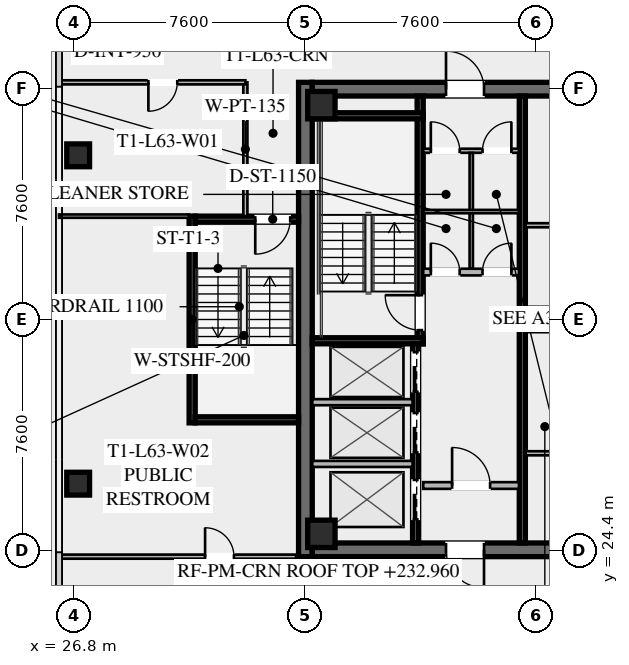
"""IFC4 building model, lengths in metres.
Left out: names, types, materials, properties, quantities, classifications, styles, units other than length and angle.
Written with IfcOpenShell. Run it as: python <this file> out.ifc"""

import sys

from ifc_helpers import new_model, si_unit, direction, frame, frame_2d, origin, origin_2d, place, context, subcontext, project, spatial, rectangle, hollow_rectangle, extrude, element, fill, save


model = new_model("IFC4")
c1 = context("Model", 3, precision=1e-05, world=origin(), true_north=direction((0.0, 1.0)))
c2 = subcontext(c1, "Body", "Model", "MODEL_VIEW")
j1 = project(units=[si_unit("LENGTHUNIT", "METRE"), si_unit("PLANEANGLEUNIT", "RADIAN")], contexts=[c1])
p1 = place(None, origin())
s1 = spatial("IfcSite", under=j1, at=p1, CompositionType="ELEMENT")
p2 = place(p1, origin())
s2 = spatial("IfcBuilding", under=s1, at=p2, CompositionType="ELEMENT")
p3 = place(p2, frame((0.0, 0.0, 232.6)))
s3 = spatial("IfcBuildingStorey", under=s2, at=p3, CompositionType="ELEMENT", Elevation=232.6)
p4 = place(p3, frame((34.425, 24.2, 0.0), z_axis=(0.0, 0.0, 1.0), x_axis=(0.0, 1.0, 0.0)))
e1 = element("IfcWall", 1, at=p4, inside=s3, PredefinedType="SHEAR", context=c2, shape_type="SweptSolid", body=[
    extrude(rectangle(XDim=15.6, YDim=0.45, at=frame_2d((7.8, 0.0))), origin(), (0.0, 0.0, 1.0), 3.55),
])
p5 = place(p3, frame((49.35, 24.425, 0.0), z_axis=(0.0, 0.0, 1.0), x_axis=(-1.0, 0.0, 0.0)))
e2 = element("IfcWall", 2, at=p5, inside=s3, PredefinedType="SHEAR", context=c2, shape_type="SweptSolid", body=[
    extrude(rectangle(XDim=14.7, YDim=0.45, at=frame_2d((7.35, 0.0))), origin(), (0.0, 0.0, 1.0), 3.55),
])
p6 = place(p5, frame((9.05, 0.0, 0.0)))
e3 = element("IfcOpeningElement", 3, at=p6, cuts=e2, PredefinedType="OPENING", context=c2, shape_type="SweptSolid", body=[
    extrude(rectangle(XDim=1.25, YDim=2.25, at=frame_2d((0.625, 1.125))), frame((0.0, 0.235, 0.0), z_axis=(0.0, -1.0, 0.0), x_axis=(1.0, 0.0, 0.0)), (0.0, 0.0, 1.0), 0.47),
])
p7 = place(p5, frame((4.0, 0.0, 0.0)))
e4 = element("IfcOpeningElement", 4, at=p7, cuts=e2, PredefinedType="OPENING", context=c2, shape_type="SweptSolid", body=[
    extrude(rectangle(XDim=1.25, YDim=2.25, at=frame_2d((0.625, 1.125))), frame((0.0, 0.235, 0.0), z_axis=(0.0, -1.0, 0.0), x_axis=(1.0, 0.0, 0.0)), (0.0, 0.0, 1.0), 0.47),
])
p8 = place(p3, frame((34.65, 39.575, 0.0), z_axis=(0.0, 0.0, 1.0), x_axis=(1.0, 0.0, 0.0)))
e5 = element("IfcWall", 5, at=p8, inside=s3, PredefinedType="SHEAR", context=c2, shape_type="SweptSolid", body=[
    extrude(rectangle(XDim=14.7, YDim=0.45, at=frame_2d((7.35, 0.0))), origin(), (0.0, 0.0, 1.0), 3.55),
])
p9 = place(p8, frame((4.4, 0.0, 0.0)))
e6 = element("IfcOpeningElement", 6, at=p9, cuts=e5, PredefinedType="OPENING", context=c2, shape_type="SweptSolid", body=[
    extrude(rectangle(XDim=1.25, YDim=2.25, at=frame_2d((0.625, 1.125))), frame((0.0, 0.235, 0.0), z_axis=(0.0, -1.0, 0.0), x_axis=(1.0, 0.0, 0.0)), (0.0, 0.0, 1.0), 0.47),
])
p10 = place(p8, frame((9.45, 0.0, 0.0)))
e7 = element("IfcOpeningElement", 7, at=p10, cuts=e5, PredefinedType="OPENING", context=c2, shape_type="SweptSolid", body=[
    extrude(rectangle(XDim=1.25, YDim=2.25, at=frame_2d((0.625, 1.125))), frame((0.0, 0.235, 0.0), z_axis=(0.0, -1.0, 0.0), x_axis=(1.0, 0.0, 0.0)), (0.0, 0.0, 1.0), 0.47),
])
for number, where, z_axis, x_axis in (
    (8, (34.95, 24.95, 0.0), (0.0, 0.0, 1.0), (1.0, 0.0, 0.0)),
    (9, (34.95, 39.05, 0.0), (0.0, 0.0, 1.0), (1.0, 0.0, 0.0)),
):
    element("IfcColumn", number, at=place(p3, frame(where, z_axis=z_axis, x_axis=x_axis)), inside=s3, PredefinedType="COLUMN", context=c2, shape_type="SweptSolid", body=[
        extrude(hollow_rectangle(XDim=0.9, YDim=0.9, WallThickness=0.04, at=origin_2d()), origin(), (0.0, 0.0, 1.0), 3.37),
    ])
for number, where, z_axis, x_axis in (
    (10, (26.95, 37.4, -0.175), (0.0, 0.0, 1.0), (1.0, 0.0, 0.0)),
    (11, (26.95, 26.6, -0.175), (0.0, 0.0, 1.0), (1.0, 0.0, 0.0)),
):
    element("IfcColumn", number, at=place(p3, frame(where, z_axis=z_axis, x_axis=x_axis)), inside=s3, PredefinedType="COLUMN", context=c2, shape_type="SweptSolid", body=[
        extrude(hollow_rectangle(XDim=0.75, YDim=0.75, WallThickness=0.032, at=origin_2d()), origin(), (0.0, 0.0, 1.0), 3.545),
    ])
p11 = place(p3, frame((38.2, 31.2, 0.0), z_axis=(0.0, 0.0, 1.0), x_axis=(0.0, 1.0, 0.0)))
e12 = element("IfcWall", 12, at=p11, inside=s3, PredefinedType="SHEAR", context=c2, shape_type="SweptSolid", body=[
    extrude(rectangle(XDim=8.15, YDim=0.2, at=frame_2d((4.075, 0.0))), origin(), (0.0, 0.0, 1.0), 3.37),
])
p12 = place(p11, frame((0.45, 0.0, 0.0)))
e13 = element("IfcOpeningElement", 13, at=p12, cuts=e12, PredefinedType="OPENING", context=c2, shape_type="SweptSolid", body=[
    extrude(rectangle(XDim=1.15, YDim=2.2, at=frame_2d((0.575, 1.1))), frame((0.0, 0.11, 0.0), z_axis=(0.0, -1.0, 0.0), x_axis=(1.0, 0.0, 0.0)), (0.0, 0.0, 1.0), 0.22),
])
for number, where, z_axis, x_axis in (
    (14, (34.65, 31.3, 0.0), (0.0, 0.0, 1.0), (1.0, 0.0, 0.0)),
    (15, (34.65, 38.7, 0.0), (0.0, 0.0, 1.0), (1.0, 0.0, 0.0)),
):
    element("IfcWall", number, at=place(p3, frame(where, z_axis=z_axis, x_axis=x_axis)), inside=s3, PredefinedType="SHEAR", context=c2, shape_type="SweptSolid", body=[
        extrude(rectangle(XDim=3.65, YDim=0.2, at=frame_2d((1.825, 0.0))), origin(), (0.0, 0.0, 1.0), 3.37),
    ])
p13 = place(p3, frame((41.56, 24.65, 0.0), z_axis=(0.0, 0.0, 1.0), x_axis=(0.0, 1.0, 0.0)))
e16 = element("IfcWall", 16, at=p13, inside=s3, PredefinedType="SHEAR", context=c2, shape_type="SweptSolid", body=[
    extrude(rectangle(XDim=14.7, YDim=0.2, at=frame_2d((7.35, 0.0))), origin(), (0.0, 0.0, 1.0), 3.37),
])
p14 = place(p3, frame((38.3, 33.56, 0.0), z_axis=(0.0, 0.0, 1.0), x_axis=(1.0, 0.0, 0.0)))
e17 = element("IfcWall", 17, at=p14, inside=s3, PredefinedType="SOLIDWALL", context=c2, shape_type="SweptSolid", body=[
    extrude(rectangle(XDim=3.15, YDim=0.22, at=frame_2d((1.575, 0.0))), origin(), (0.0, 0.0, 1.0), 2.723),
])
p15 = place(p14, frame((0.25, 0.0, 0.0)))
e18 = element("IfcOpeningElement", 18, at=p15, cuts=e17, PredefinedType="OPENING", context=c2, shape_type="SweptSolid", body=[
    extrude(rectangle(XDim=0.95, YDim=2.05, at=frame_2d((0.475, 1.025))), frame((0.0, 0.12, 0.0), z_axis=(0.0, -1.0, 0.0), x_axis=(1.0, 0.0, 0.0)), (0.0, 0.0, 1.0), 0.24),
])
p16 = place(p14, frame((1.95, 0.0, 0.0)))
e19 = element("IfcOpeningElement", 19, at=p16, cuts=e17, PredefinedType="OPENING", context=c2, shape_type="SweptSolid", body=[
    extrude(rectangle(XDim=0.95, YDim=2.05, at=frame_2d((0.475, 1.025))), frame((0.0, 0.12, 0.0), z_axis=(0.0, -1.0, 0.0), x_axis=(1.0, 0.0, 0.0)), (0.0, 0.0, 1.0), 0.24),
])
p17 = place(p3, frame((38.3, 26.54, 0.0), z_axis=(0.0, 0.0, 1.0), x_axis=(1.0, 0.0, 0.0)))
e20 = element("IfcWall", 20, at=p17, inside=s3, PredefinedType="SOLIDWALL", context=c2, shape_type="SweptSolid", body=[
    extrude(rectangle(XDim=3.15, YDim=0.22, at=frame_2d((1.575, 0.0))), origin(), (0.0, 0.0, 1.0), 2.723),
])
p18 = place(p17, frame((0.95, 0.0, 0.0)))
e21 = element("IfcOpeningElement", 21, at=p18, cuts=e20, PredefinedType="OPENING", context=c2, shape_type="SweptSolid", body=[
    extrude(rectangle(XDim=1.25, YDim=2.25, at=frame_2d((0.625, 1.125))), frame((0.0, 0.12, 0.0), z_axis=(0.0, -1.0, 0.0), x_axis=(1.0, 0.0, 0.0)), (0.0, 0.0, 1.0), 0.24),
])
p19 = place(p3, frame((38.05, 24.65, 0.0), z_axis=(0.0, 0.0, 1.0), x_axis=(0.0, 1.0, 0.0)))
e22 = element("IfcWall", 22, at=p19, inside=s3, PredefinedType="SHEAR", context=c2, shape_type="SweptSolid", body=[
    extrude(rectangle(XDim=6.55, YDim=0.2, at=frame_2d((3.275, 0.0))), origin(), (0.0, 0.0, 1.0), 3.37),
])
p20 = place(p19, frame((4.975, 0.0, 0.0)))
e23 = element("IfcOpeningElement", 23, at=p20, cuts=e22, PredefinedType="OPENING", context=c2, shape_type="SweptSolid", body=[
    extrude(rectangle(XDim=1.3, YDim=2.25, at=frame_2d((0.65, 1.125))), frame((0.0, 0.11, 0.0), z_axis=(0.0, -1.0, 0.0), x_axis=(1.0, 0.0, 0.0)), (0.0, 0.0, 1.0), 0.22),
])
p21 = place(p19, frame((2.975, 0.0, 0.0)))
e24 = element("IfcOpeningElement", 24, at=p21, cuts=e22, PredefinedType="OPENING", context=c2, shape_type="SweptSolid", body=[
    extrude(rectangle(XDim=1.3, YDim=2.25, at=frame_2d((0.65, 1.125))), frame((0.0, 0.11, 0.0), z_axis=(0.0, -1.0, 0.0), x_axis=(1.0, 0.0, 0.0)), (0.0, 0.0, 1.0), 0.22),
])
p22 = place(p19, frame((0.775, 0.0, 0.0)))
e25 = element("IfcOpeningElement", 25, at=p22, cuts=e22, PredefinedType="OPENING", context=c2, shape_type="SweptSolid", body=[
    extrude(rectangle(XDim=1.3, YDim=2.25, at=frame_2d((0.65, 1.125))), frame((0.0, 0.11, 0.0), z_axis=(0.0, -1.0, 0.0), x_axis=(1.0, 0.0, 0.0)), (0.0, 0.0, 1.0), 0.22),
])
for number, where, z_axis, x_axis in (
    (26, (34.65, 27.25, 0.0), (0.0, 0.0, 1.0), (1.0, 0.0, 0.0)),
    (27, (34.65, 29.28, 0.0), (0.0, 0.0, 1.0), (1.0, 0.0, 0.0)),
):
    element("IfcWall", number, at=place(p3, frame(where, z_axis=z_axis, x_axis=x_axis)), inside=s3, PredefinedType="SOLIDWALL", context=c2, shape_type="SweptSolid", body=[
        extrude(rectangle(XDim=3.3, YDim=0.2, at=frame_2d((1.65, 0.0))), origin(), (0.0, 0.0, 1.0), 3.37),
    ])
p23 = place(p3, frame((38.3, 37.55, 0.0), z_axis=(0.0, 0.0, 1.0), x_axis=(1.0, 0.0, 0.0)))
e28 = element("IfcWall", 28, at=p23, inside=s3, PredefinedType="PARTITIONING", context=c2, shape_type="SweptSolid", body=[
    extrude(rectangle(XDim=3.15, YDim=0.135, at=frame_2d((1.575, 0.0))), origin(), (0.0, 0.0, 1.0), 2.723),
])
p24 = place(p23, frame((0.25, 0.0, 0.0)))
e29 = element("IfcOpeningElement", 29, at=p24, cuts=e28, PredefinedType="OPENING", context=c2, shape_type="SweptSolid", body=[
    extrude(rectangle(XDim=0.95, YDim=2.05, at=frame_2d((0.475, 1.025))), frame((0.0, 0.077, 0.0), z_axis=(0.0, -1.0, 0.0), x_axis=(1.0, 0.0, 0.0)), (0.0, 0.0, 1.0), 0.155),
])
p25 = place(p23, frame((1.95, 0.0, 0.0)))
e30 = element("IfcOpeningElement", 30, at=p25, cuts=e28, PredefinedType="OPENING", context=c2, shape_type="SweptSolid", body=[
    extrude(rectangle(XDim=0.95, YDim=2.05, at=frame_2d((0.475, 1.025))), frame((0.0, 0.077, 0.0), z_axis=(0.0, -1.0, 0.0), x_axis=(1.0, 0.0, 0.0)), (0.0, 0.0, 1.0), 0.155),
])
p26 = place(p3, frame((39.88, 33.68, 0.0), z_axis=(0.0, 0.0, 1.0), x_axis=(0.0, 1.0, 0.0)))
e31 = element("IfcWall", 31, at=p26, inside=s3, PredefinedType="PARTITIONING", context=c2, shape_type="SweptSolid", body=[
    extrude(rectangle(XDim=3.8, YDim=0.11, at=frame_2d((1.9, 0.0))), origin(), (0.0, 0.0, 1.0), 2.723),
])
p27 = place(p3, frame((38.3, 35.55, 0.0), z_axis=(0.0, 0.0, 1.0), x_axis=(1.0, 0.0, 0.0)))
e32 = element("IfcWall", 32, at=p27, inside=s3, PredefinedType="PARTITIONING", context=c2, shape_type="SweptSolid", body=[
    extrude(rectangle(XDim=3.15, YDim=0.11, at=frame_2d((1.575, 0.0))), origin(), (0.0, 0.0, 1.0), 2.723),
])
for number, where, z_axis, x_axis in (
    (33, (41.67, 31.65, 0.0), (0.0, 0.0, 1.0), (1.0, 0.0, 0.0)),
    (34, (41.67, 27.6, 0.0), (0.0, 0.0, 1.0), (1.0, 0.0, 0.0)),
    (35, (41.67, 32.35, 0.0), (0.0, 0.0, 1.0), (1.0, 0.0, 0.0)),
    (36, (41.67, 35.1, 0.0), (0.0, 0.0, 1.0), (1.0, 0.0, 0.0)),
):
    element("IfcWall", number, at=place(p3, frame(where, z_axis=z_axis, x_axis=x_axis)), inside=s3, PredefinedType="PARTITIONING", context=c2, shape_type="SweptSolid", body=[
        extrude(rectangle(XDim=1.88, YDim=0.135, at=frame_2d((0.94, 0.0))), origin(), (0.0, 0.0, 1.0), 2.723),
    ])
p28 = place(p3, frame((30.7, 28.6, 0.0), z_axis=(0.0, 0.0, 1.0), x_axis=(0.0, 1.0, 0.0)))
e37 = element("IfcWall", 37, at=p28, inside=s3, PredefinedType="SHEAR", context=c2, shape_type="SweptSolid", body=[
    extrude(rectangle(XDim=6.8, YDim=0.2, at=frame_2d((3.4, 0.0))), origin(), (0.0, 0.0, 1.0), 3.37),
])
p29 = place(p3, frame((34.2, 35.3, 0.0), z_axis=(0.0, 0.0, 1.0), x_axis=(-1.0, 0.0, 0.0)))
e38 = element("IfcWall", 38, at=p29, inside=s3, PredefinedType="SHEAR", context=c2, shape_type="SweptSolid", body=[
    extrude(rectangle(XDim=3.4, YDim=0.2, at=frame_2d((1.7, 0.0))), origin(), (0.0, 0.0, 1.0), 3.37),
])
p30 = place(p29, frame((0.275, 0.0, 0.0)))
e39 = element("IfcOpeningElement", 39, at=p30, cuts=e38, PredefinedType="OPENING", context=c2, shape_type="SweptSolid", body=[
    extrude(rectangle(XDim=1.15, YDim=2.2, at=frame_2d((0.575, 1.1))), frame((0.0, 0.11, 0.0), z_axis=(0.0, -1.0, 0.0), x_axis=(1.0, 0.0, 0.0)), (0.0, 0.0, 1.0), 0.22),
])
p31 = place(p3, frame((30.8, 28.7, 0.0), z_axis=(0.0, 0.0, 1.0), x_axis=(1.0, 0.0, 0.0)))
e40 = element("IfcWall", 40, at=p31, inside=s3, PredefinedType="SHEAR", context=c2, shape_type="SweptSolid", body=[
    extrude(rectangle(XDim=3.4, YDim=0.2, at=frame_2d((1.7, 0.0))), origin(), (0.0, 0.0, 1.0), 3.37),
])
p32 = place(p3, frame((32.45, 35.4, 0.0), z_axis=(0.0, 0.0, 1.0), x_axis=(0.0, 1.0, 0.0)))
e41 = element("IfcWall", 41, at=p32, inside=s3, PredefinedType="PARTITIONING", context=c2, shape_type="SweptSolid", body=[
    extrude(rectangle(XDim=4.4, YDim=0.135, at=frame_2d((2.2, 0.0))), origin(), (0.0, 0.0, 1.0), 2.723),
])
p33 = place(p3, frame((32.45, 39.8, 0.0), z_axis=(0.0, 0.0, 1.0), x_axis=(-1.0, 0.0, 0.0)))
e42 = element("IfcWall", 42, at=p33, inside=s3, PredefinedType="PARTITIONING", context=c2, shape_type="SweptSolid", body=[
    extrude(rectangle(XDim=6.13, YDim=0.135, at=frame_2d((3.065, 0.0))), origin(), (0.0, 0.0, 1.0), 2.723),
])
p34 = place(p33, frame((2.24, 0.0, 0.0)))
e43 = element("IfcOpeningElement", 43, at=p34, cuts=e42, PredefinedType="OPENING", context=c2, shape_type="SweptSolid", body=[
    extrude(rectangle(XDim=0.95, YDim=2.05, at=frame_2d((0.475, 1.025))), frame((0.0, 0.077, 0.0), z_axis=(0.0, -1.0, 0.0), x_axis=(1.0, 0.0, 0.0)), (0.0, 0.0, 1.0), 0.155),
])
p35 = place(p3, frame((26.32, 24.2, 0.0), z_axis=(0.0, 0.0, 1.0), x_axis=(1.0, 0.0, 0.0)))
e44 = element("IfcWall", 44, at=p35, inside=s3, PredefinedType="PARTITIONING", context=c2, shape_type="SweptSolid", body=[
    extrude(rectangle(XDim=7.8, YDim=0.135, at=frame_2d((3.9, 0.0))), origin(), (0.0, 0.0, 1.0), 2.723),
])
p36 = place(p35, frame((4.805, 0.0, 0.0)))
e45 = element("IfcOpeningElement", 45, at=p36, cuts=e44, PredefinedType="OPENING", context=c2, shape_type="SweptSolid", body=[
    extrude(rectangle(XDim=0.95, YDim=2.05, at=frame_2d((0.475, 1.025))), frame((0.0, 0.077, 0.0), z_axis=(0.0, -1.0, 0.0), x_axis=(1.0, 0.0, 0.0)), (0.0, 0.0, 1.0), 0.155),
])
p37 = place(p3, frame((30.6, 35.4, 0.0), z_axis=(0.0, 0.0, 1.0), x_axis=(-1.0, 0.0, 0.0)))
e46 = element("IfcWall", 46, at=p37, inside=s3, PredefinedType="PARTITIONING", context=c2, shape_type="SweptSolid", body=[
    extrude(rectangle(XDim=4.28, YDim=0.11, at=frame_2d((2.14, 0.0))), origin(), (0.0, 0.0, 1.0), 2.723),
])
p38 = place(p9, origin())
e47 = element("IfcDoor", 47, at=p38, inside=s3, OperationType="SINGLE_SWING_LEFT", PredefinedType="DOOR", context=c2, shape_type="SweptSolid", body=[
    extrude(rectangle(XDim=1.25, YDim=2.25, at=frame_2d((0.625, 1.125))), frame((0.0, 0.025, 0.0), z_axis=(0.0, -1.0, 0.0), x_axis=(1.0, 0.0, 0.0)), (0.0, 0.0, 1.0), 0.05),
])
fill(e6, e47)
p39 = place(p6, origin())
e48 = element("IfcDoor", 48, at=p39, inside=s3, OperationType="SINGLE_SWING_LEFT", PredefinedType="DOOR", context=c2, shape_type="SweptSolid", body=[
    extrude(rectangle(XDim=1.25, YDim=2.25, at=frame_2d((0.625, 1.125))), frame((0.0, 0.025, 0.0), z_axis=(0.0, -1.0, 0.0), x_axis=(1.0, 0.0, 0.0)), (0.0, 0.0, 1.0), 0.05),
])
fill(e3, e48)
p40 = place(p12, origin())
e49 = element("IfcDoor", 49, at=p40, inside=s3, OperationType="SINGLE_SWING_RIGHT", PredefinedType="DOOR", context=c2, shape_type="SweptSolid", body=[
    extrude(rectangle(XDim=1.15, YDim=2.2, at=frame_2d((0.575, 1.1))), frame((0.0, 0.025, 0.0), z_axis=(0.0, -1.0, 0.0), x_axis=(1.0, 0.0, 0.0)), (0.0, 0.0, 1.0), 0.05),
])
fill(e13, e49)
p41 = place(p18, origin())
e50 = element("IfcDoor", 50, at=p41, inside=s3, OperationType="SINGLE_SWING_LEFT", PredefinedType="DOOR", context=c2, shape_type="SweptSolid", body=[
    extrude(rectangle(XDim=1.25, YDim=2.25, at=frame_2d((0.625, 1.125))), frame((0.0, 0.025, 0.0), z_axis=(0.0, -1.0, 0.0), x_axis=(1.0, 0.0, 0.0)), (0.0, 0.0, 1.0), 0.05),
])
fill(e21, e50)
p42 = place(p24, origin())
e51 = element("IfcDoor", 51, at=p42, inside=s3, OperationType="SINGLE_SWING_LEFT", PredefinedType="DOOR", context=c2, shape_type="SweptSolid", body=[
    extrude(rectangle(XDim=0.95, YDim=2.05, at=frame_2d((0.475, 1.025))), frame((0.0, 0.025, 0.0), z_axis=(0.0, -1.0, 0.0), x_axis=(1.0, 0.0, 0.0)), (0.0, 0.0, 1.0), 0.05),
])
fill(e29, e51)
p43 = place(p25, origin())
e52 = element("IfcDoor", 52, at=p43, inside=s3, OperationType="SINGLE_SWING_RIGHT", PredefinedType="DOOR", context=c2, shape_type="SweptSolid", body=[
    extrude(rectangle(XDim=0.95, YDim=2.05, at=frame_2d((0.475, 1.025))), frame((0.0, 0.025, 0.0), z_axis=(0.0, -1.0, 0.0), x_axis=(1.0, 0.0, 0.0)), (0.0, 0.0, 1.0), 0.05),
])
fill(e30, e52)
p44 = place(p15, origin())
e53 = element("IfcDoor", 53, at=p44, inside=s3, OperationType="SINGLE_SWING_LEFT", PredefinedType="DOOR", context=c2, shape_type="SweptSolid", body=[
    extrude(rectangle(XDim=0.95, YDim=2.05, at=frame_2d((0.475, 1.025))), frame((0.0, 0.025, 0.0), z_axis=(0.0, -1.0, 0.0), x_axis=(1.0, 0.0, 0.0)), (0.0, 0.0, 1.0), 0.05),
])
fill(e18, e53)
p45 = place(p16, origin())
e54 = element("IfcDoor", 54, at=p45, inside=s3, OperationType="SINGLE_SWING_RIGHT", PredefinedType="DOOR", context=c2, shape_type="SweptSolid", body=[
    extrude(rectangle(XDim=0.95, YDim=2.05, at=frame_2d((0.475, 1.025))), frame((0.0, 0.025, 0.0), z_axis=(0.0, -1.0, 0.0), x_axis=(1.0, 0.0, 0.0)), (0.0, 0.0, 1.0), 0.05),
])
fill(e19, e54)
p46 = place(p30, origin())
e55 = element("IfcDoor", 55, at=p46, inside=s3, OperationType="SINGLE_SWING_RIGHT", PredefinedType="DOOR", context=c2, shape_type="SweptSolid", body=[
    extrude(rectangle(XDim=1.15, YDim=2.2, at=frame_2d((0.575, 1.1))), frame((0.0, 0.025, 0.0), z_axis=(0.0, -1.0, 0.0), x_axis=(1.0, 0.0, 0.0)), (0.0, 0.0, 1.0), 0.05),
])
fill(e39, e55)
p47 = place(p34, origin())
e56 = element("IfcDoor", 56, at=p47, inside=s3, OperationType="SINGLE_SWING_RIGHT", PredefinedType="DOOR", context=c2, shape_type="SweptSolid", body=[
    extrude(rectangle(XDim=0.95, YDim=2.05, at=frame_2d((0.475, 1.025))), frame((0.0, 0.025, 0.0), z_axis=(0.0, -1.0, 0.0), x_axis=(1.0, 0.0, 0.0)), (0.0, 0.0, 1.0), 0.05),
])
fill(e43, e56)
p48 = place(p36, origin())
e57 = element("IfcDoor", 57, at=p48, inside=s3, OperationType="SINGLE_SWING_LEFT", PredefinedType="DOOR", context=c2, shape_type="SweptSolid", body=[
    extrude(rectangle(XDim=0.95, YDim=2.05, at=frame_2d((0.475, 1.025))), frame((0.0, 0.025, 0.0), z_axis=(0.0, -1.0, 0.0), x_axis=(1.0, 0.0, 0.0)), (0.0, 0.0, 1.0), 0.05),
])
fill(e45, e57)
p49 = place(p20, origin())
e58 = element("IfcDoor", 58, at=p49, inside=s3, OperationType="SLIDING_TO_LEFT", PredefinedType="DOOR", context=c2, shape_type="SweptSolid", body=[
    extrude(rectangle(XDim=1.3, YDim=2.25, at=frame_2d((0.65, 1.125))), frame((0.0, 0.025, 0.0), z_axis=(0.0, -1.0, 0.0), x_axis=(1.0, 0.0, 0.0)), (0.0, 0.0, 1.0), 0.05),
])
fill(e23, e58)
p50 = place(p21, origin())
e59 = element("IfcDoor", 59, at=p50, inside=s3, OperationType="SLIDING_TO_LEFT", PredefinedType="DOOR", context=c2, shape_type="SweptSolid", body=[
    extrude(rectangle(XDim=1.3, YDim=2.25, at=frame_2d((0.65, 1.125))), frame((0.0, 0.025, 0.0), z_axis=(0.0, -1.0, 0.0), x_axis=(1.0, 0.0, 0.0)), (0.0, 0.0, 1.0), 0.05),
])
fill(e24, e59)
p51 = place(p22, origin())
e60 = element("IfcDoor", 60, at=p51, inside=s3, OperationType="SLIDING_TO_LEFT", PredefinedType="DOOR", context=c2, shape_type="SweptSolid", body=[
    extrude(rectangle(XDim=1.3, YDim=2.25, at=frame_2d((0.65, 1.125))), frame((0.0, 0.025, 0.0), z_axis=(0.0, -1.0, 0.0), x_axis=(1.0, 0.0, 0.0)), (0.0, 0.0, 1.0), 0.05),
])
fill(e25, e60)
save(model, sys.argv[1])
